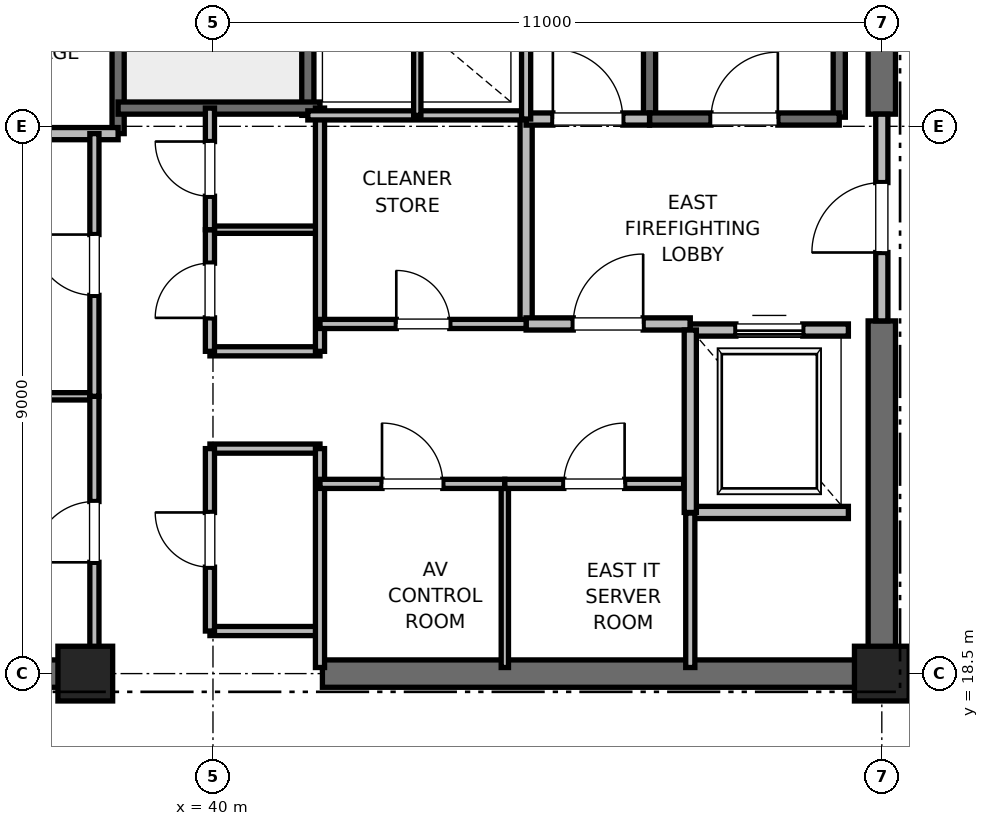
"""IFC4 building model, lengths in metres.
Left out: names, types, materials, properties, quantities, classifications, styles, units other than length and angle.
Written with IfcOpenShell. Run it as: python <this file> out.ifc"""

import sys

from ifc_helpers import new_model, si_unit, direction, frame, frame_2d, origin, origin_2d, place, context, subcontext, project, spatial, rectangle, extrude, element, fill, save


model = new_model("IFC4")
c1 = context("Model", 3, precision=1e-05, world=origin(), true_north=direction((0.0, 1.0)))
c2 = subcontext(c1, "Body", "Model", "MODEL_VIEW")
j1 = project(units=[si_unit("LENGTHUNIT", "METRE"), si_unit("PLANEANGLEUNIT", "RADIAN")], contexts=[c1])
p1 = place(None, origin())
s1 = spatial("IfcSite", under=j1, at=p1, CompositionType="ELEMENT")
p2 = place(p1, origin())
s2 = spatial("IfcBuilding", under=s1, at=p2, CompositionType="ELEMENT")
p3 = place(p2, frame((0.0, 0.0, 279.2)))
s3 = spatial("IfcBuildingStorey", under=s2, at=p3, CompositionType="ELEMENT", Elevation=279.2)
for number, where, z_axis, x_axis in (
    (1, (51.0, 18.5, 0.0), (0.0, 0.0, 1.0), (1.0, 0.0, 0.0)),
    (2, (37.9, 18.5, 0.0), (0.0, 0.0, 1.0), (1.0, 0.0, 0.0)),
):
    element("IfcColumn", number, at=place(p3, frame(where, z_axis=z_axis, x_axis=x_axis)), inside=s3, PredefinedType="PILASTER", context=c2, shape_type="SweptSolid", body=[
        extrude(rectangle(XDim=0.9, YDim=0.9, at=origin_2d()), origin(), (0.0, 0.0, 1.0), 4.0),
    ])
for number, where, z_axis, x_axis in (
    (3, (29.0, 18.5, 0.0), (0.0, 0.0, 1.0), (1.0, 0.0, 0.0)),
    (4, (41.8, 18.5, 0.0), (0.0, 0.0, 1.0), (1.0, 0.0, 0.0)),
):
    element("IfcWall", number, at=place(p3, frame(where, z_axis=z_axis, x_axis=x_axis)), inside=s3, PredefinedType="SHEAR", context=c2, shape_type="SweptSolid", body=[
        extrude(rectangle(XDim=9.2, YDim=0.45, at=frame_2d((4.6, 0.0))), origin(), (0.0, 0.0, 1.0), 3.785),
    ])
p4 = place(p3, frame((51.0, 18.5, 0.0), z_axis=(0.0, 0.0, 1.0), x_axis=(0.0, 1.0, 0.0)))
e5 = element("IfcWall", 5, at=p4, inside=s3, PredefinedType="SHEAR", context=c2, shape_type="SweptSolid", body=[
    extrude(rectangle(XDim=5.8, YDim=0.45, at=frame_2d((2.9, 0.0))), origin(), (0.0, 0.0, 1.0), 3.785),
])
p5 = place(p3, frame((51.0, 27.7, 0.0), z_axis=(0.0, 0.0, 1.0), x_axis=(0.0, 1.0, 0.0)))
e6 = element("IfcWall", 6, at=p5, inside=s3, PredefinedType="SHEAR", context=c2, shape_type="SweptSolid", body=[
    extrude(rectangle(XDim=8.8, YDim=0.45, at=frame_2d((4.4, 0.0))), origin(), (0.0, 0.0, 1.0), 3.785),
])
p6 = place(p3, frame((50.3, 27.65, 0.0), z_axis=(0.0, 0.0, 1.0), x_axis=(0.0, 1.0, 0.0)))
e7 = element("IfcWall", 7, at=p6, inside=s3, PredefinedType="SOLIDWALL", context=c2, shape_type="SweptSolid", body=[
    extrude(rectangle(XDim=8.15, YDim=0.2, at=frame_2d((4.075, 0.0))), origin(), (0.0, 0.0, 1.0), 3.785),
])
p7 = place(p3, frame((47.18, 27.62, 0.0), z_axis=(0.0, 0.0, 1.0), x_axis=(0.0, 1.0, 0.0)))
e8 = element("IfcWall", 8, at=p7, inside=s3, PredefinedType="SOLIDWALL", context=c2, shape_type="SweptSolid", body=[
    extrude(rectangle(XDim=8.18, YDim=0.2, at=frame_2d((4.09, 0.0))), origin(), (0.0, 0.0, 1.0), 3.785),
])
p8 = place(p3, frame((47.18, 27.62, 0.0), z_axis=(0.0, 0.0, 1.0), x_axis=(1.0, 0.0, 0.0)))
e9 = element("IfcWall", 9, at=p8, inside=s3, PredefinedType="SOLIDWALL", context=c2, shape_type="SweptSolid", body=[
    extrude(rectangle(XDim=3.12, YDim=0.2, at=frame_2d((1.56, 0.0))), origin(), (0.0, 0.0, 1.0), 3.785),
])
p9 = place(p8, frame((1.01, 0.0, 0.0)))
e10 = element("IfcOpeningElement", 10, at=p9, cuts=e9, PredefinedType="OPENING", context=c2, shape_type="SweptSolid", body=[
    extrude(rectangle(XDim=1.1, YDim=2.15, at=frame_2d((0.55, 1.075))), frame((0.0, 0.1, 0.0), z_axis=(0.0, -1.0, 0.0), x_axis=(1.0, 0.0, 0.0)), (0.0, 0.0, 1.0), 0.2),
])
p10 = place(p3, frame((38.44, 27.38, 0.0), z_axis=(0.0, 0.0, 1.0), x_axis=(0.0, 1.0, 0.0)))
e11 = element("IfcWall", 11, at=p10, inside=s3, PredefinedType="SOLIDWALL", context=c2, shape_type="SweptSolid", body=[
    extrude(rectangle(XDim=8.87, YDim=0.2, at=frame_2d((4.435, 0.0))), origin(), (0.0, 0.0, 1.0), 3.785),
])
p11 = place(p3, frame((41.56, 27.68, 0.0), z_axis=(0.0, 0.0, 1.0), x_axis=(0.0, 1.0, 0.0)))
e12 = element("IfcWall", 12, at=p11, inside=s3, PredefinedType="SOLIDWALL", context=c2, shape_type="SweptSolid", body=[
    extrude(rectangle(XDim=8.57, YDim=0.2, at=frame_2d((4.285, 0.0))), origin(), (0.0, 0.0, 1.0), 3.785),
])
p12 = place(p3, frame((38.44, 27.8, 0.0), z_axis=(0.0, 0.0, 1.0), x_axis=(1.0, 0.0, 0.0)))
e13 = element("IfcWall", 13, at=p12, inside=s3, PredefinedType="SOLIDWALL", context=c2, shape_type="SweptSolid", body=[
    extrude(rectangle(XDim=3.32, YDim=0.2, at=frame_2d((1.66, 0.0))), origin(), (0.0, 0.0, 1.0), 3.785),
])
p13 = place(p3, frame((32.82, 27.38, 0.0), z_axis=(0.0, 0.0, 1.0), x_axis=(1.0, 0.0, 0.0)))
e14 = element("IfcWall", 14, at=p13, inside=s3, PredefinedType="PARTITIONING", context=c2, shape_type="SweptSolid", body=[
    extrude(rectangle(XDim=5.62, YDim=0.2, at=frame_2d((2.81, 0.0))), origin(), (0.0, 0.0, 1.0), 3.785),
])
p14 = place(p3, frame((45.15, 24.25, 0.0), z_axis=(0.0, 0.0, 1.0), x_axis=(0.0, 1.0, 0.0)))
e15 = element("IfcWall", 15, at=p14, inside=s3, PredefinedType="PARTITIONING", context=c2, shape_type="SweptSolid", body=[
    extrude(rectangle(XDim=3.37, YDim=0.2, at=frame_2d((1.685, 0.0))), origin(), (0.0, 0.0, 1.0), 3.785),
])
p15 = place(p3, frame((45.15, 24.25, 0.0), z_axis=(0.0, 0.0, 1.0), x_axis=(1.0, 0.0, 0.0)))
e16 = element("IfcWall", 16, at=p15, inside=s3, PredefinedType="PARTITIONING", context=c2, shape_type="SweptSolid", body=[
    extrude(rectangle(XDim=2.7, YDim=0.2, at=frame_2d((1.35, 0.0))), origin(), (0.0, 0.0, 1.0), 3.785),
])
p16 = place(p15, frame((0.775, 0.0, 0.0)))
e17 = element("IfcOpeningElement", 17, at=p16, cuts=e16, PredefinedType="OPENING", context=c2, shape_type="SweptSolid", body=[
    extrude(rectangle(XDim=1.15, YDim=2.2, at=frame_2d((0.575, 1.1))), frame((0.0, 0.1, 0.0), z_axis=(0.0, -1.0, 0.0), x_axis=(1.0, 0.0, 0.0)), (0.0, 0.0, 1.0), 0.2),
])
p17 = place(p3, frame((45.15, 27.62, 0.0), z_axis=(0.0, 0.0, 1.0), x_axis=(1.0, 0.0, 0.0)))
e18 = element("IfcWall", 18, at=p17, inside=s3, PredefinedType="PARTITIONING", context=c2, shape_type="SweptSolid", body=[
    extrude(rectangle(XDim=2.03, YDim=0.2, at=frame_2d((1.015, 0.0))), origin(), (0.0, 0.0, 1.0), 3.785),
])
p18 = place(p17, frame((0.44, 0.0, 0.0)))
e19 = element("IfcOpeningElement", 19, at=p18, cuts=e18, PredefinedType="OPENING", context=c2, shape_type="SweptSolid", body=[
    extrude(rectangle(XDim=1.15, YDim=2.2, at=frame_2d((0.575, 1.1))), frame((0.0, 0.1, 0.0), z_axis=(0.0, -1.0, 0.0), x_axis=(1.0, 0.0, 0.0)), (0.0, 0.0, 1.0), 0.2),
])
p19 = place(p3, frame((51.0, 24.3, 0.0), z_axis=(0.0, 0.0, 1.0), x_axis=(0.0, 1.0, 0.0)))
e20 = element("IfcWall", 20, at=p19, inside=s3, PredefinedType="PARTITIONING", context=c2, shape_type="SweptSolid", body=[
    extrude(rectangle(XDim=3.4, YDim=0.2, at=frame_2d((1.7, 0.0))), origin(), (0.0, 0.0, 1.0), 2.865),
])
p20 = place(p19, frame((1.125, 0.0, 0.0)))
e21 = element("IfcOpeningElement", 21, at=p20, cuts=e20, PredefinedType="OPENING", context=c2, shape_type="SweptSolid", body=[
    extrude(rectangle(XDim=1.15, YDim=2.2, at=frame_2d((0.575, 1.1))), frame((0.0, 0.1, 0.0), z_axis=(0.0, -1.0, 0.0), x_axis=(1.0, 0.0, 0.0)), (0.0, 0.0, 1.0), 0.2),
])
p21 = place(p3, frame((47.85, 21.15, 0.0), z_axis=(0.0, 0.0, 1.0), x_axis=(1.0, 0.0, 0.0)))
e22 = element("IfcWall", 22, at=p21, inside=s3, PredefinedType="SOLIDWALL", context=c2, shape_type="SweptSolid", body=[
    extrude(rectangle(XDim=2.6, YDim=0.2, at=frame_2d((1.3, 0.0))), origin(), (0.0, 0.0, 1.0), 3.785),
])
p22 = place(p3, frame((50.45, 24.15, 0.0), z_axis=(0.0, 0.0, 1.0), x_axis=(-1.0, 0.0, 0.0)))
e23 = element("IfcWall", 23, at=p22, inside=s3, PredefinedType="SOLIDWALL", context=c2, shape_type="SweptSolid", body=[
    extrude(rectangle(XDim=2.6, YDim=0.2, at=frame_2d((1.3, 0.0))), origin(), (0.0, 0.0, 1.0), 2.865),
])
p23 = place(p22, frame((0.75, 0.0, 0.0)))
e24 = element("IfcOpeningElement", 24, at=p23, cuts=e23, PredefinedType="OPENING", context=c2, shape_type="SweptSolid", body=[
    extrude(rectangle(XDim=1.1, YDim=2.2, at=frame_2d((0.55, 1.1))), frame((0.0, 0.1, 0.0), z_axis=(0.0, -1.0, 0.0), x_axis=(1.0, 0.0, 0.0)), (0.0, 0.0, 1.0), 0.2),
])
p24 = place(p3, frame((47.85, 24.15, 0.0), z_axis=(0.0, 0.0, 1.0), x_axis=(0.0, -1.0, 0.0)))
e25 = element("IfcWall", 25, at=p24, inside=s3, PredefinedType="SOLIDWALL", context=c2, shape_type="SweptSolid", body=[
    extrude(rectangle(XDim=3.0, YDim=0.2, at=frame_2d((1.5, 0.0))), origin(), (0.0, 0.0, 1.0), 3.785),
])
for number, where, z_axis, x_axis in (
    (26, (39.95, 19.2, 0.0), (0.0, 0.0, 1.0), (1.0, 0.0, 0.0)),
    (27, (39.95, 22.2, 0.0), (0.0, 0.0, 1.0), (1.0, 0.0, 0.0)),
    (28, (39.95, 23.8, 0.0), (0.0, 0.0, 1.0), (1.0, 0.0, 0.0)),
):
    element("IfcWall", number, at=place(p3, frame(where, z_axis=z_axis, x_axis=x_axis)), inside=s3, PredefinedType="PARTITIONING", context=c2, shape_type="SweptSolid", body=[
        extrude(rectangle(XDim=1.81, YDim=0.15, at=frame_2d((0.905, 0.0))), origin(), (0.0, 0.0, 1.0), 2.85),
    ])
p25 = place(p3, frame((39.95, 25.8, 0.0), z_axis=(0.0, 0.0, 1.0), x_axis=(1.0, 0.0, 0.0)))
e29 = element("IfcWall", 29, at=p25, inside=s3, PredefinedType="PARTITIONING", context=c2, shape_type="SweptSolid", body=[
    extrude(rectangle(XDim=1.81, YDim=0.12, at=frame_2d((0.905, 0.0))), origin(), (0.0, 0.0, 1.0), 2.85),
])
p26 = place(p3, frame((41.76, 18.6, 0.0), z_axis=(0.0, 0.0, 1.0), x_axis=(0.0, 1.0, 0.0)))
e30 = element("IfcWall", 30, at=p26, inside=s3, PredefinedType="PARTITIONING", context=c2, shape_type="SweptSolid", body=[
    extrude(rectangle(XDim=3.6, YDim=0.15, at=frame_2d((1.8, 0.0))), origin(), (0.0, 0.0, 1.0), 2.85),
])
p27 = place(p3, frame((41.76, 23.8, 0.0), z_axis=(0.0, 0.0, 1.0), x_axis=(0.0, 1.0, 0.0)))
e31 = element("IfcWall", 31, at=p27, inside=s3, PredefinedType="PARTITIONING", context=c2, shape_type="SweptSolid", body=[
    extrude(rectangle(XDim=4.0, YDim=0.15, at=frame_2d((2.0, 0.0))), origin(), (0.0, 0.0, 1.0), 2.85),
])
p28 = place(p3, frame((39.95, 19.2, 0.0), z_axis=(0.0, 0.0, 1.0), x_axis=(0.0, 1.0, 0.0)))
e32 = element("IfcWall", 32, at=p28, inside=s3, PredefinedType="PARTITIONING", context=c2, shape_type="SweptSolid", body=[
    extrude(rectangle(XDim=3.0, YDim=0.15, at=frame_2d((1.5, 0.0))), origin(), (0.0, 0.0, 1.0), 2.85),
])
p29 = place(p28, frame((1.05, 0.0, 0.0)))
e33 = element("IfcOpeningElement", 33, at=p29, cuts=e32, PredefinedType="OPENING", context=c2, shape_type="SweptSolid", body=[
    extrude(rectangle(XDim=0.9, YDim=2.1, at=frame_2d((0.45, 1.05))), frame((0.0, 0.075, 0.0), z_axis=(0.0, -1.0, 0.0), x_axis=(1.0, 0.0, 0.0)), (0.0, 0.0, 1.0), 0.15),
])
p30 = place(p3, frame((39.95, 23.8, 0.0), z_axis=(0.0, 0.0, 1.0), x_axis=(0.0, 1.0, 0.0)))
e34 = element("IfcWall", 34, at=p30, inside=s3, PredefinedType="PARTITIONING", context=c2, shape_type="SweptSolid", body=[
    extrude(rectangle(XDim=2.0, YDim=0.15, at=frame_2d((1.0, 0.0))), origin(), (0.0, 0.0, 1.0), 2.85),
])
p31 = place(p30, frame((0.55, 0.0, 0.0)))
e35 = element("IfcOpeningElement", 35, at=p31, cuts=e34, PredefinedType="OPENING", context=c2, shape_type="SweptSolid", body=[
    extrude(rectangle(XDim=0.9, YDim=2.1, at=frame_2d((0.45, 1.05))), frame((0.0, 0.075, 0.0), z_axis=(0.0, -1.0, 0.0), x_axis=(1.0, 0.0, 0.0)), (0.0, 0.0, 1.0), 0.15),
])
p32 = place(p3, frame((39.95, 25.8, 0.0), z_axis=(0.0, 0.0, 1.0), x_axis=(0.0, 1.0, 0.0)))
e36 = element("IfcWall", 36, at=p32, inside=s3, PredefinedType="PARTITIONING", context=c2, shape_type="SweptSolid", body=[
    extrude(rectangle(XDim=2.0, YDim=0.15, at=frame_2d((1.0, 0.0))), origin(), (0.0, 0.0, 1.0), 2.85),
])
p33 = place(p32, frame((0.55, 0.0, 0.0)))
e37 = element("IfcOpeningElement", 37, at=p33, cuts=e36, PredefinedType="OPENING", context=c2, shape_type="SweptSolid", body=[
    extrude(rectangle(XDim=0.9, YDim=2.1, at=frame_2d((0.45, 1.05))), frame((0.0, 0.075, 0.0), z_axis=(0.0, -1.0, 0.0), x_axis=(1.0, 0.0, 0.0)), (0.0, 0.0, 1.0), 0.15),
])
p34 = place(p3, frame((32.82, 23.06, 0.0), z_axis=(0.0, 0.0, 1.0), x_axis=(1.0, 0.0, 0.0)))
e38 = element("IfcWall", 38, at=p34, inside=s3, PredefinedType="PARTITIONING", context=c2, shape_type="SweptSolid", body=[
    extrude(rectangle(XDim=5.23, YDim=0.12, at=frame_2d((2.615, 0.0))), origin(), (0.0, 0.0, 1.0), 2.85),
])
p35 = place(p3, frame((38.05, 18.6, 0.0), z_axis=(0.0, 0.0, 1.0), x_axis=(0.0, 1.0, 0.0)))
e39 = element("IfcWall", 39, at=p35, inside=s3, PredefinedType="PARTITIONING", context=c2, shape_type="SweptSolid", body=[
    extrude(rectangle(XDim=4.46, YDim=0.15, at=frame_2d((2.23, 0.0))), origin(), (0.0, 0.0, 1.0), 2.85),
])
p36 = place(p35, frame((1.73, 0.0, 0.0)))
e40 = element("IfcOpeningElement", 40, at=p36, cuts=e39, PredefinedType="OPENING", context=c2, shape_type="SweptSolid", body=[
    extrude(rectangle(XDim=1.0, YDim=2.15, at=frame_2d((0.5, 1.075))), frame((0.0, 0.075, 0.0), z_axis=(0.0, -1.0, 0.0), x_axis=(1.0, 0.0, 0.0)), (0.0, 0.0, 1.0), 0.15),
])
p37 = place(p3, frame((38.05, 23.06, 0.0), z_axis=(0.0, 0.0, 1.0), x_axis=(0.0, 1.0, 0.0)))
e41 = element("IfcWall", 41, at=p37, inside=s3, PredefinedType="PARTITIONING", context=c2, shape_type="SweptSolid", body=[
    extrude(rectangle(XDim=4.32, YDim=0.15, at=frame_2d((2.16, 0.0))), origin(), (0.0, 0.0, 1.0), 2.85),
])
p38 = place(p37, frame((1.66, 0.0, 0.0)))
e42 = element("IfcOpeningElement", 42, at=p38, cuts=e41, PredefinedType="OPENING", context=c2, shape_type="SweptSolid", body=[
    extrude(rectangle(XDim=1.0, YDim=2.15, at=frame_2d((0.5, 1.075))), frame((0.0, 0.075, 0.0), z_axis=(0.0, -1.0, 0.0), x_axis=(1.0, 0.0, 0.0)), (0.0, 0.0, 1.0), 0.15),
])
p39 = place(p3, frame((41.56, 27.68, 0.0), z_axis=(0.0, 0.0, 1.0), x_axis=(1.0, 0.0, 0.0)))
e43 = element("IfcWall", 43, at=p39, inside=s3, PredefinedType="PARTITIONING", context=c2, shape_type="SweptSolid", body=[
    extrude(rectangle(XDim=3.59, YDim=0.15, at=frame_2d((1.795, 0.0))), origin(), (0.0, 0.0, 1.0), 2.85),
])
p40 = place(p3, frame((47.85, 18.6, 0.0), z_axis=(0.0, 0.0, 1.0), x_axis=(0.0, 1.0, 0.0)))
e44 = element("IfcWall", 44, at=p40, inside=s3, PredefinedType="PARTITIONING", context=c2, shape_type="SweptSolid", body=[
    extrude(rectangle(XDim=2.54, YDim=0.15, at=frame_2d((1.27, 0.0))), origin(), (0.0, 0.0, 1.0), 2.85),
])
p41 = place(p3, frame((44.8, 18.6, 0.0), z_axis=(0.0, 0.0, 1.0), x_axis=(0.0, 1.0, 0.0)))
e45 = element("IfcWall", 45, at=p41, inside=s3, PredefinedType="PARTITIONING", context=c2, shape_type="SweptSolid", body=[
    extrude(rectangle(XDim=3.02, YDim=0.12, at=frame_2d((1.51, 0.0))), origin(), (0.0, 0.0, 1.0), 2.85),
])
p42 = place(p3, frame((41.76, 21.62, 0.0), z_axis=(0.0, 0.0, 1.0), x_axis=(1.0, 0.0, 0.0)))
e46 = element("IfcWall", 46, at=p42, inside=s3, PredefinedType="PARTITIONING", context=c2, shape_type="SweptSolid", body=[
    extrude(rectangle(XDim=3.04, YDim=0.15, at=frame_2d((1.52, 0.0))), origin(), (0.0, 0.0, 1.0), 2.85),
])
p43 = place(p42, frame((1.02, 0.0, 0.0)))
e47 = element("IfcOpeningElement", 47, at=p43, cuts=e46, PredefinedType="OPENING", context=c2, shape_type="SweptSolid", body=[
    extrude(rectangle(XDim=1.0, YDim=2.15, at=frame_2d((0.5, 1.075))), frame((0.0, 0.075, 0.0), z_axis=(0.0, -1.0, 0.0), x_axis=(1.0, 0.0, 0.0)), (0.0, 0.0, 1.0), 0.15),
])
p44 = place(p3, frame((44.8, 21.62, 0.0), z_axis=(0.0, 0.0, 1.0), x_axis=(1.0, 0.0, 0.0)))
e48 = element("IfcWall", 48, at=p44, inside=s3, PredefinedType="PARTITIONING", context=c2, shape_type="SweptSolid", body=[
    extrude(rectangle(XDim=2.94, YDim=0.15, at=frame_2d((1.47, 0.0))), origin(), (0.0, 0.0, 1.0), 2.85),
])
p45 = place(p44, frame((0.97, 0.0, 0.0)))
e49 = element("IfcOpeningElement", 49, at=p45, cuts=e48, PredefinedType="OPENING", context=c2, shape_type="SweptSolid", body=[
    extrude(rectangle(XDim=1.0, YDim=2.15, at=frame_2d((0.5, 1.075))), frame((0.0, 0.075, 0.0), z_axis=(0.0, -1.0, 0.0), x_axis=(1.0, 0.0, 0.0)), (0.0, 0.0, 1.0), 0.15),
])
p46 = place(p3, frame((41.76, 24.25, 0.0), z_axis=(0.0, 0.0, 1.0), x_axis=(1.0, 0.0, 0.0)))
e50 = element("IfcWall", 50, at=p46, inside=s3, PredefinedType="PARTITIONING", context=c2, shape_type="SweptSolid", body=[
    extrude(rectangle(XDim=3.39, YDim=0.15, at=frame_2d((1.695, 0.0))), origin(), (0.0, 0.0, 1.0), 2.85),
])
p47 = place(p46, frame((1.255, 0.0, 0.0)))
e51 = element("IfcOpeningElement", 51, at=p47, cuts=e50, PredefinedType="OPENING", context=c2, shape_type="SweptSolid", body=[
    extrude(rectangle(XDim=0.88, YDim=2.1, at=frame_2d((0.44, 1.05))), frame((0.0, 0.075, 0.0), z_axis=(0.0, -1.0, 0.0), x_axis=(1.0, 0.0, 0.0)), (0.0, 0.0, 1.0), 0.15),
])
p48 = place(p3, frame((45.15, 27.62, 0.0), z_axis=(0.0, 0.0, 1.0), x_axis=(0.0, 1.0, 0.0)))
e52 = element("IfcWall", 52, at=p48, inside=s3, PredefinedType="PARTITIONING", context=c2, shape_type="SweptSolid", body=[
    extrude(rectangle(XDim=3.1, YDim=0.15, at=frame_2d((1.55, 0.0))), origin(), (0.0, 0.0, 1.0), 2.85),
])
p49 = place(p3, frame((43.36, 27.68, 0.0), z_axis=(0.0, 0.0, 1.0), x_axis=(0.0, 1.0, 0.0)))
e53 = element("IfcWall", 53, at=p49, inside=s3, PredefinedType="PARTITIONING", context=c2, shape_type="SweptSolid", body=[
    extrude(rectangle(XDim=3.04, YDim=0.12, at=frame_2d((1.52, 0.0))), origin(), (0.0, 0.0, 1.0), 2.85),
])
p50 = place(p9, origin())
e54 = element("IfcDoor", 54, at=p50, inside=s3, OperationType="SINGLE_SWING_RIGHT", PredefinedType="DOOR", context=c2, shape_type="SweptSolid", body=[
    extrude(rectangle(XDim=1.1, YDim=2.15, at=frame_2d((0.55, 1.075))), frame((0.0, 0.025, 0.0), z_axis=(0.0, -1.0, 0.0), x_axis=(1.0, 0.0, 0.0)), (0.0, 0.0, 1.0), 0.05),
])
fill(e10, e54)
p51 = place(p16, origin())
e55 = element("IfcDoor", 55, at=p51, inside=s3, OperationType="SINGLE_SWING_RIGHT", PredefinedType="DOOR", context=c2, shape_type="SweptSolid", body=[
    extrude(rectangle(XDim=1.15, YDim=2.2, at=frame_2d((0.575, 1.1))), frame((0.0, 0.025, 0.0), z_axis=(0.0, -1.0, 0.0), x_axis=(1.0, 0.0, 0.0)), (0.0, 0.0, 1.0), 0.05),
])
fill(e17, e55)
p52 = place(p18, origin())
e56 = element("IfcDoor", 56, at=p52, inside=s3, OperationType="SINGLE_SWING_LEFT", PredefinedType="DOOR", context=c2, shape_type="SweptSolid", body=[
    extrude(rectangle(XDim=1.15, YDim=2.2, at=frame_2d((0.575, 1.1))), frame((0.0, 0.025, 0.0), z_axis=(0.0, -1.0, 0.0), x_axis=(1.0, 0.0, 0.0)), (0.0, 0.0, 1.0), 0.05),
])
fill(e19, e56)
p53 = place(p20, origin())
e57 = element("IfcDoor", 57, at=p53, inside=s3, OperationType="SINGLE_SWING_LEFT", PredefinedType="DOOR", context=c2, shape_type="SweptSolid", body=[
    extrude(rectangle(XDim=1.15, YDim=2.2, at=frame_2d((0.575, 1.1))), frame((0.0, 0.025, 0.0), z_axis=(0.0, -1.0, 0.0), x_axis=(1.0, 0.0, 0.0)), (0.0, 0.0, 1.0), 0.05),
])
fill(e21, e57)
p54 = place(p23, origin())
e58 = element("IfcDoor", 58, at=p54, inside=s3, OperationType="SLIDING_TO_RIGHT", PredefinedType="DOOR", context=c2, shape_type="SweptSolid", body=[
    extrude(rectangle(XDim=1.1, YDim=2.2, at=frame_2d((0.55, 1.1))), frame((0.0, 0.025, 0.0), z_axis=(0.0, -1.0, 0.0), x_axis=(1.0, 0.0, 0.0)), (0.0, 0.0, 1.0), 0.05),
])
fill(e24, e58)
p55 = place(p29, origin())
e59 = element("IfcDoor", 59, at=p55, inside=s3, OperationType="SINGLE_SWING_RIGHT", PredefinedType="DOOR", context=c2, shape_type="SweptSolid", body=[
    extrude(rectangle(XDim=0.9, YDim=2.1, at=frame_2d((0.45, 1.05))), frame((0.0, 0.025, 0.0), z_axis=(0.0, -1.0, 0.0), x_axis=(1.0, 0.0, 0.0)), (0.0, 0.0, 1.0), 0.05),
])
fill(e33, e59)
p56 = place(p31, origin())
e60 = element("IfcDoor", 60, at=p56, inside=s3, OperationType="SINGLE_SWING_LEFT", PredefinedType="DOOR", context=c2, shape_type="SweptSolid", body=[
    extrude(rectangle(XDim=0.9, YDim=2.1, at=frame_2d((0.45, 1.05))), frame((0.0, 0.025, 0.0), z_axis=(0.0, -1.0, 0.0), x_axis=(1.0, 0.0, 0.0)), (0.0, 0.0, 1.0), 0.05),
])
fill(e35, e60)
p57 = place(p33, origin())
e61 = element("IfcDoor", 61, at=p57, inside=s3, OperationType="SINGLE_SWING_RIGHT", PredefinedType="DOOR", context=c2, shape_type="SweptSolid", body=[
    extrude(rectangle(XDim=0.9, YDim=2.1, at=frame_2d((0.45, 1.05))), frame((0.0, 0.025, 0.0), z_axis=(0.0, -1.0, 0.0), x_axis=(1.0, 0.0, 0.0)), (0.0, 0.0, 1.0), 0.05),
])
fill(e37, e61)
p58 = place(p36, origin())
e62 = element("IfcDoor", 62, at=p58, inside=s3, OperationType="SINGLE_SWING_LEFT", PredefinedType="DOOR", context=c2, shape_type="SweptSolid", body=[
    extrude(rectangle(XDim=1.0, YDim=2.15, at=frame_2d((0.5, 1.075))), frame((0.0, 0.025, 0.0), z_axis=(0.0, -1.0, 0.0), x_axis=(1.0, 0.0, 0.0)), (0.0, 0.0, 1.0), 0.05),
])
fill(e40, e62)
p59 = place(p38, origin())
e63 = element("IfcDoor", 63, at=p59, inside=s3, OperationType="SINGLE_SWING_RIGHT", PredefinedType="DOOR", context=c2, shape_type="SweptSolid", body=[
    extrude(rectangle(XDim=1.0, YDim=2.15, at=frame_2d((0.5, 1.075))), frame((0.0, 0.025, 0.0), z_axis=(0.0, -1.0, 0.0), x_axis=(1.0, 0.0, 0.0)), (0.0, 0.0, 1.0), 0.05),
])
fill(e42, e63)
p60 = place(p43, origin())
e64 = element("IfcDoor", 64, at=p60, inside=s3, OperationType="SINGLE_SWING_LEFT", PredefinedType="DOOR", context=c2, shape_type="SweptSolid", body=[
    extrude(rectangle(XDim=1.0, YDim=2.15, at=frame_2d((0.5, 1.075))), frame((0.0, 0.025, 0.0), z_axis=(0.0, -1.0, 0.0), x_axis=(1.0, 0.0, 0.0)), (0.0, 0.0, 1.0), 0.05),
])
fill(e47, e64)
p61 = place(p45, origin())
e65 = element("IfcDoor", 65, at=p61, inside=s3, OperationType="SINGLE_SWING_RIGHT", PredefinedType="DOOR", context=c2, shape_type="SweptSolid", body=[
    extrude(rectangle(XDim=1.0, YDim=2.15, at=frame_2d((0.5, 1.075))), frame((0.0, 0.025, 0.0), z_axis=(0.0, -1.0, 0.0), x_axis=(1.0, 0.0, 0.0)), (0.0, 0.0, 1.0), 0.05),
])
fill(e49, e65)
p62 = place(p47, origin())
e66 = element("IfcDoor", 66, at=p62, inside=s3, OperationType="SINGLE_SWING_LEFT", PredefinedType="DOOR", context=c2, shape_type="SweptSolid", body=[
    extrude(rectangle(XDim=0.88, YDim=2.1, at=frame_2d((0.44, 1.05))), frame((0.0, 0.025, 0.0), z_axis=(0.0, -1.0, 0.0), x_axis=(1.0, 0.0, 0.0)), (0.0, 0.0, 1.0), 0.05),
])
fill(e51, e66)
save(model, sys.argv[1])
